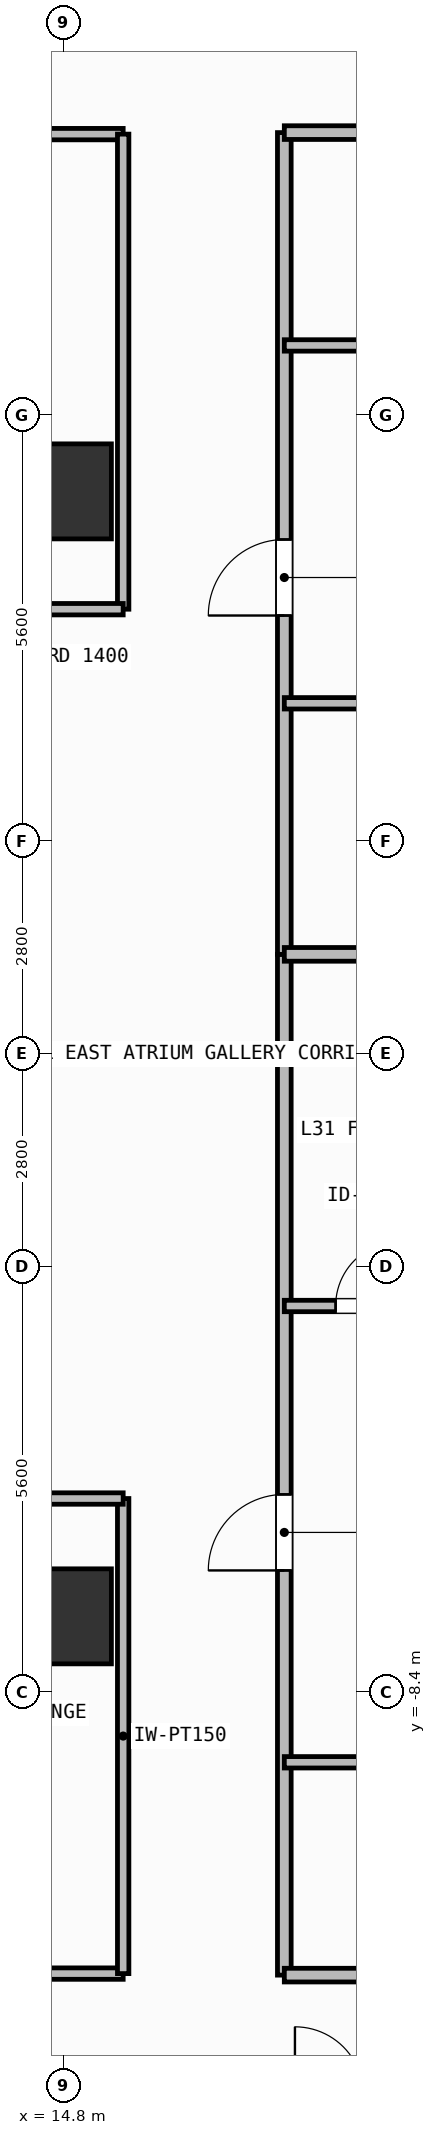
"""IFC4 building model, lengths in metres.
Left out: names, types, materials, properties, quantities, classifications, styles, units other than length and angle.
Written with IfcOpenShell. Run it as: python <this file> out.ifc"""

import sys

from ifc_helpers import new_model, si_unit, direction, frame, frame_2d, origin, origin_2d, place, context, subcontext, project, spatial, rectangle, extrude, element, fill, save


model = new_model("IFC4")
c1 = context("Model", 3, precision=1e-05, world=origin(), true_north=direction((0.0, 1.0)))
c2 = subcontext(c1, "Body", "Model", "MODEL_VIEW")
j1 = project(units=[si_unit("LENGTHUNIT", "METRE"), si_unit("PLANEANGLEUNIT", "RADIAN")], contexts=[c1])
p1 = place(None, origin())
s1 = spatial("IfcSite", under=j1, at=p1, CompositionType="ELEMENT")
p2 = place(p1, origin())
s2 = spatial("IfcBuilding", under=s1, at=p2, CompositionType="ELEMENT")
p3 = place(p2, frame((0.0, 0.0, 125.1)))
s3 = spatial("IfcBuildingStorey", under=s2, at=p3, CompositionType="ELEMENT", Elevation=125.1)
for number, where, z_axis, x_axis in (
    (1, (14.8, -7.4, 0.0), (0.0, 0.0, 1.0), (1.0, 0.0, 0.0)),
    (2, (14.8, 7.4, 0.0), (0.0, 0.0, 1.0), (1.0, 0.0, 0.0)),
):
    element("IfcColumn", number, at=place(p3, frame(where, z_axis=z_axis, x_axis=x_axis)), inside=s3, PredefinedType="COLUMN", context=c2, shape_type="SweptSolid", body=[
        extrude(rectangle(XDim=1.25, YDim=1.25, at=origin_2d()), origin(), (0.0, 0.0, 1.0), 3.9),
    ])
p4 = place(p3, frame((10.1, -12.1, 0.0), z_axis=(0.0, 0.0, 1.0), x_axis=(1.0, 0.0, 0.0)))
e3 = element("IfcWall", 3, at=p4, inside=s3, PredefinedType="PARTITIONING", context=c2, shape_type="SweptSolid", body=[
    extrude(rectangle(XDim=5.48, YDim=0.15, at=frame_2d((2.74, 0.0))), origin(), (0.0, 0.0, 1.0), 3.68),
])
p5 = place(p4, frame((2.29, 0.0, 0.0)))
e4 = element("IfcOpeningElement", 4, at=p5, cuts=e3, PredefinedType="OPENING", context=c2, shape_type="SweptSolid", body=[
    extrude(rectangle(XDim=0.9, YDim=2.1, at=frame_2d((0.45, 1.05))), frame((0.0, 0.085, 0.0), z_axis=(0.0, -1.0, 0.0), x_axis=(1.0, 0.0, 0.0)), (0.0, 0.0, 1.0), 0.17),
])
p6 = place(p3, frame((8.36, 12.1, 0.0), z_axis=(0.0, 0.0, 1.0), x_axis=(1.0, 0.0, 0.0)))
e5 = element("IfcWall", 5, at=p6, inside=s3, PredefinedType="PARTITIONING", context=c2, shape_type="SweptSolid", body=[
    extrude(rectangle(XDim=7.22, YDim=0.15, at=frame_2d((3.61, 0.0))), origin(), (0.0, 0.0, 1.0), 3.68),
])
p7 = place(p6, frame((3.513, 0.0, 0.0)))
e6 = element("IfcOpeningElement", 6, at=p7, cuts=e5, PredefinedType="OPENING", context=c2, shape_type="SweptSolid", body=[
    extrude(rectangle(XDim=0.9, YDim=2.1, at=frame_2d((0.45, 1.05))), frame((0.0, 0.085, 0.0), z_axis=(0.0, -1.0, 0.0), x_axis=(1.0, 0.0, 0.0)), (0.0, 0.0, 1.0), 0.17),
])
p8 = place(p3, frame((17.7, -12.12, 0.0), z_axis=(0.0, 0.0, 1.0), x_axis=(0.0, 1.0, 0.0)))
e7 = element("IfcWall", 7, at=p8, inside=s3, PredefinedType="PARTITIONING", context=c2, shape_type="SweptSolid", body=[
    extrude(rectangle(XDim=13.429, YDim=0.18, at=frame_2d((6.715, 0.0))), origin(), (0.0, 0.0, 1.0), 3.68),
])
p9 = place(p8, frame((5.324, 0.0, 0.0)))
e8 = element("IfcOpeningElement", 8, at=p9, cuts=e7, PredefinedType="OPENING", context=c2, shape_type="SweptSolid", body=[
    extrude(rectangle(XDim=1.0, YDim=2.2, at=frame_2d((0.5, 1.1))), frame((0.0, 0.1, 0.0), z_axis=(0.0, -1.0, 0.0), x_axis=(1.0, 0.0, 0.0)), (0.0, 0.0, 1.0), 0.2),
])
p10 = place(p3, frame((17.7, -3.317, 0.0), z_axis=(0.0, 0.0, 1.0), x_axis=(1.0, 0.0, 0.0)))
e9 = element("IfcWall", 9, at=p10, inside=s3, PredefinedType="PARTITIONING", context=c2, shape_type="SweptSolid", body=[
    extrude(rectangle(XDim=2.372, YDim=0.15, at=frame_2d((1.186, 0.0))), origin(), (0.0, 0.0, 1.0), 3.68),
])
p11 = place(p10, frame((0.675, 0.0, 0.0)))
e10 = element("IfcOpeningElement", 10, at=p11, cuts=e9, PredefinedType="OPENING", context=c2, shape_type="SweptSolid", body=[
    extrude(rectangle(XDim=0.85, YDim=2.1, at=frame_2d((0.425, 1.05))), frame((0.0, 0.085, 0.0), z_axis=(0.0, -1.0, 0.0), x_axis=(1.0, 0.0, 0.0)), (0.0, 0.0, 1.0), 0.17),
])
p12 = place(p3, frame((17.7, -9.32, 0.0), z_axis=(0.0, 0.0, 1.0), x_axis=(1.0, 0.0, 0.0)))
e11 = element("IfcWall", 11, at=p12, inside=s3, PredefinedType="PARTITIONING", context=c2, shape_type="SweptSolid", body=[
    extrude(rectangle(XDim=5.786, YDim=0.15, at=frame_2d((2.893, 0.0))), origin(), (0.0, 0.0, 1.0), 3.68),
])
p13 = place(p12, frame((2.468, 0.0, 0.0)))
e12 = element("IfcOpeningElement", 12, at=p13, cuts=e11, PredefinedType="OPENING", context=c2, shape_type="SweptSolid", body=[
    extrude(rectangle(XDim=0.85, YDim=2.1, at=frame_2d((0.425, 1.05))), frame((0.0, 0.085, 0.0), z_axis=(0.0, -1.0, 0.0), x_axis=(1.0, 0.0, 0.0)), (0.0, 0.0, 1.0), 0.17),
])
p14 = place(p3, frame((17.7, 1.309, 0.0), z_axis=(0.0, 0.0, 1.0), x_axis=(0.0, 1.0, 0.0)))
e13 = element("IfcWall", 13, at=p14, inside=s3, PredefinedType="PARTITIONING", context=c2, shape_type="SweptSolid", body=[
    extrude(rectangle(XDim=10.811, YDim=0.18, at=frame_2d((5.406, 0.0))), origin(), (0.0, 0.0, 1.0), 3.68),
])
p15 = place(p14, frame((4.458, 0.0, 0.0)))
e14 = element("IfcOpeningElement", 14, at=p15, cuts=e13, PredefinedType="OPENING", context=c2, shape_type="SweptSolid", body=[
    extrude(rectangle(XDim=1.0, YDim=2.2, at=frame_2d((0.5, 1.1))), frame((0.0, 0.1, 0.0), z_axis=(0.0, -1.0, 0.0), x_axis=(1.0, 0.0, 0.0)), (0.0, 0.0, 1.0), 0.2),
])
p16 = place(p3, frame((17.7, 9.32, 0.0), z_axis=(0.0, 0.0, 1.0), x_axis=(1.0, 0.0, 0.0)))
e15 = element("IfcWall", 15, at=p16, inside=s3, PredefinedType="PARTITIONING", context=c2, shape_type="SweptSolid", body=[
    extrude(rectangle(XDim=5.59, YDim=0.15, at=frame_2d((2.795, 0.0))), origin(), (0.0, 0.0, 1.0), 3.68),
])
p17 = place(p16, frame((2.458, 0.0, 0.0)))
e16 = element("IfcOpeningElement", 16, at=p17, cuts=e15, PredefinedType="OPENING", context=c2, shape_type="SweptSolid", body=[
    extrude(rectangle(XDim=0.85, YDim=2.1, at=frame_2d((0.425, 1.05))), frame((0.0, 0.085, 0.0), z_axis=(0.0, -1.0, 0.0), x_axis=(1.0, 0.0, 0.0)), (0.0, 0.0, 1.0), 0.17),
])
p18 = place(p3, frame((17.7, 4.612, 0.0), z_axis=(0.0, 0.0, 1.0), x_axis=(1.0, 0.0, 0.0)))
e17 = element("IfcWall", 17, at=p18, inside=s3, PredefinedType="PARTITIONING", context=c2, shape_type="SweptSolid", body=[
    extrude(rectangle(XDim=5.59, YDim=0.15, at=frame_2d((2.795, 0.0))), origin(), (0.0, 0.0, 1.0), 3.68),
])
p19 = place(p18, frame((2.281, 0.0, 0.0)))
e18 = element("IfcOpeningElement", 18, at=p19, cuts=e17, PredefinedType="OPENING", context=c2, shape_type="SweptSolid", body=[
    extrude(rectangle(XDim=0.85, YDim=2.1, at=frame_2d((0.425, 1.05))), frame((0.0, 0.085, 0.0), z_axis=(0.0, -1.0, 0.0), x_axis=(1.0, 0.0, 0.0)), (0.0, 0.0, 1.0), 0.17),
])
p20 = place(p3, frame((15.58, -12.1, 0.0), z_axis=(0.0, 0.0, 1.0), x_axis=(0.0, 1.0, 0.0)))
e19 = element("IfcWall", 19, at=p20, inside=s3, PredefinedType="PARTITIONING", context=c2, shape_type="SweptSolid", body=[
    extrude(rectangle(XDim=6.25, YDim=0.15, at=frame_2d((3.125, 0.0))), origin(), (0.0, 0.0, 1.0), 3.68),
])
p21 = place(p3, frame((8.96, -5.85, 0.0), z_axis=(0.0, 0.0, 1.0), x_axis=(1.0, 0.0, 0.0)))
e20 = element("IfcWall", 20, at=p21, inside=s3, PredefinedType="PARTITIONING", context=c2, shape_type="SweptSolid", body=[
    extrude(rectangle(XDim=6.62, YDim=0.15, at=frame_2d((3.31, 0.0))), origin(), (0.0, 0.0, 1.0), 3.68),
])
p22 = place(p3, frame((15.58, 5.85, 0.0), z_axis=(0.0, 0.0, 1.0), x_axis=(0.0, 1.0, 0.0)))
e21 = element("IfcWall", 21, at=p22, inside=s3, PredefinedType="PARTITIONING", context=c2, shape_type="SweptSolid", body=[
    extrude(rectangle(XDim=6.25, YDim=0.15, at=frame_2d((3.125, 0.0))), origin(), (0.0, 0.0, 1.0), 3.68),
])
p23 = place(p3, frame((8.96, 5.85, 0.0), z_axis=(0.0, 0.0, 1.0), x_axis=(1.0, 0.0, 0.0)))
e22 = element("IfcWall", 22, at=p23, inside=s3, PredefinedType="PARTITIONING", context=c2, shape_type="SweptSolid", body=[
    extrude(rectangle(XDim=6.62, YDim=0.15, at=frame_2d((3.31, 0.0))), origin(), (0.0, 0.0, 1.0), 3.68),
])
for number, where, z_axis, x_axis in (
    (23, (17.7, 1.309, 0.0), (0.0, 0.0, 1.0), (1.0, 0.0, 0.0)),
    (24, (17.7, -12.12, 0.0), (0.0, 0.0, 1.0), (1.0, 0.0, 0.0)),
    (25, (17.7, 12.12, 0.0), (0.0, 0.0, 1.0), (1.0, 0.0, 0.0)),
):
    element("IfcWall", number, at=place(p3, frame(where, z_axis=z_axis, x_axis=x_axis)), inside=s3, PredefinedType="PARTITIONING", context=c2, shape_type="SweptSolid", body=[
        extrude(rectangle(XDim=9.83, YDim=0.18, at=frame_2d((4.915, 0.0))), origin(), (0.0, 0.0, 1.0), 3.68),
    ])
p24 = place(p9, origin())
e26 = element("IfcDoor", 26, at=p24, inside=s3, OperationType="SINGLE_SWING_LEFT", PredefinedType="DOOR", context=c2, shape_type="SweptSolid", body=[
    extrude(rectangle(XDim=1.0, YDim=2.2, at=frame_2d((0.5, 1.1))), frame((0.0, 0.025, 0.0), z_axis=(0.0, -1.0, 0.0), x_axis=(1.0, 0.0, 0.0)), (0.0, 0.0, 1.0), 0.05),
])
fill(e8, e26)
p25 = place(p11, origin())
e27 = element("IfcDoor", 27, at=p25, inside=s3, OperationType="SINGLE_SWING_RIGHT", PredefinedType="DOOR", context=c2, shape_type="SweptSolid", body=[
    extrude(rectangle(XDim=0.85, YDim=2.1, at=frame_2d((0.425, 1.05))), frame((0.0, 0.025, 0.0), z_axis=(0.0, -1.0, 0.0), x_axis=(1.0, 0.0, 0.0)), (0.0, 0.0, 1.0), 0.05),
])
fill(e10, e27)
p26 = place(p15, origin())
e28 = element("IfcDoor", 28, at=p26, inside=s3, OperationType="SINGLE_SWING_LEFT", PredefinedType="DOOR", context=c2, shape_type="SweptSolid", body=[
    extrude(rectangle(XDim=1.0, YDim=2.2, at=frame_2d((0.5, 1.1))), frame((0.0, 0.025, 0.0), z_axis=(0.0, -1.0, 0.0), x_axis=(1.0, 0.0, 0.0)), (0.0, 0.0, 1.0), 0.05),
])
fill(e14, e28)
save(model, sys.argv[1])
